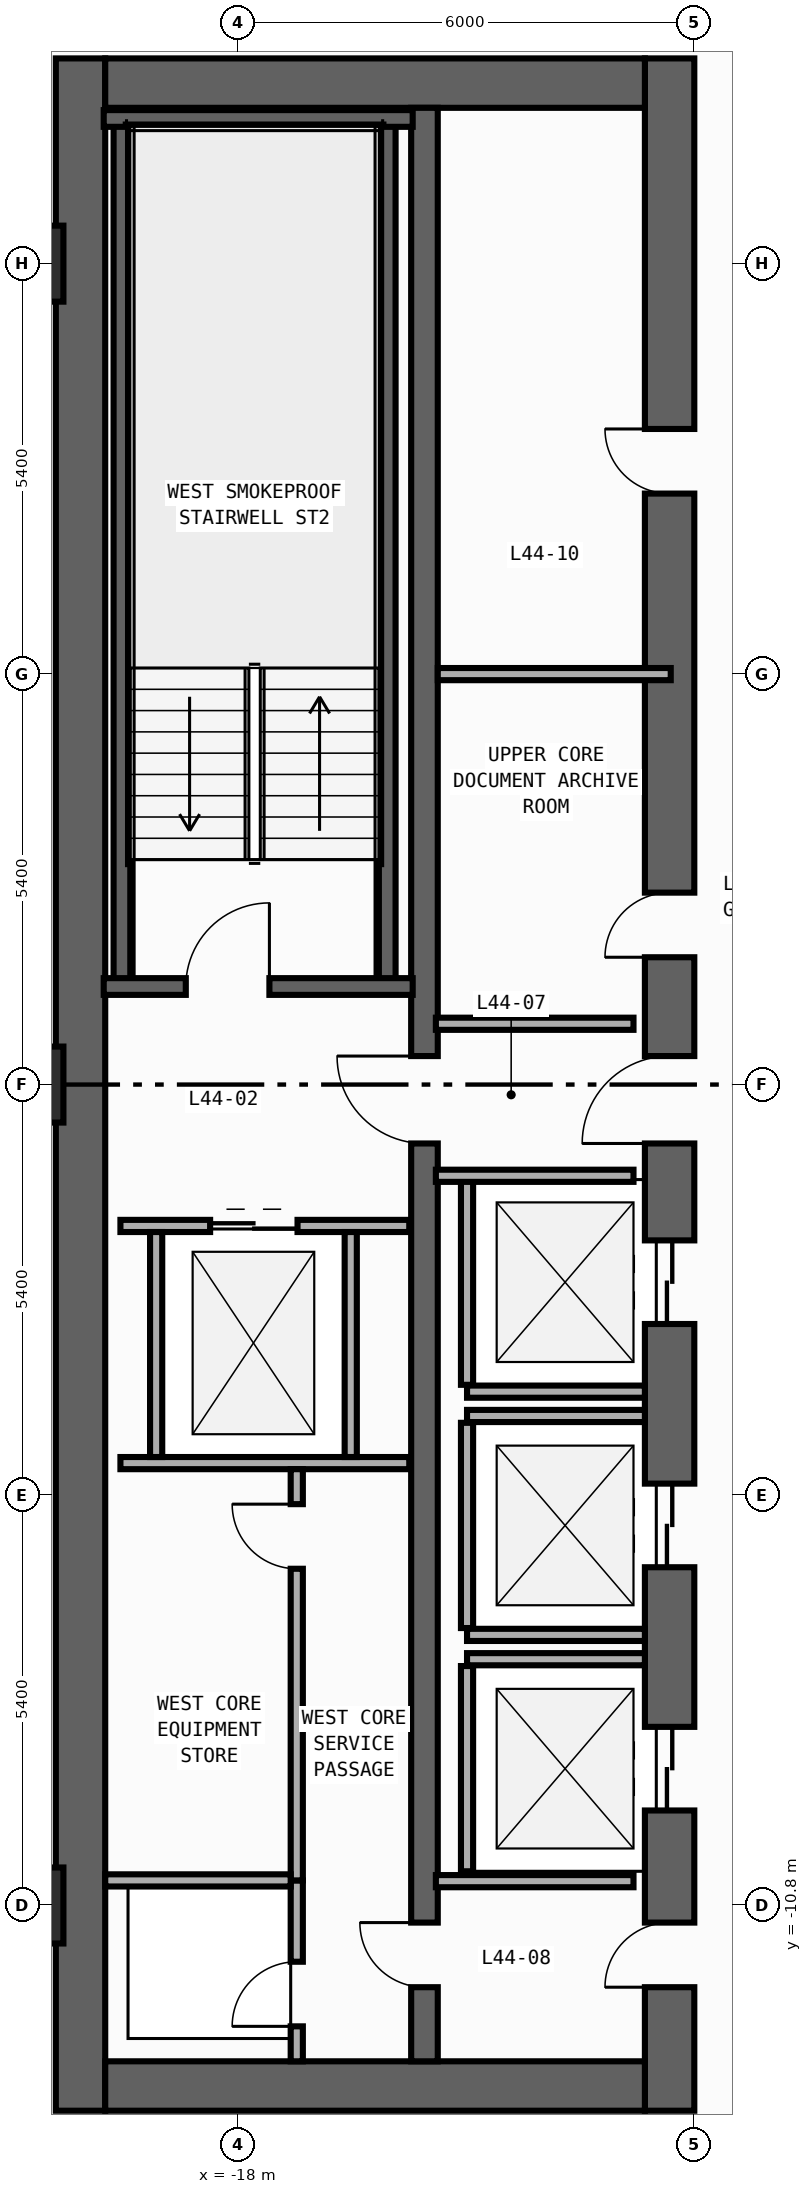
"""IFC4 building model, lengths in metres.
Left out: names, types, materials, properties, quantities, classifications, styles, units other than length and angle.
Written with IfcOpenShell. Run it as: python <this file> out.ifc"""

import sys

from ifc_helpers import new_model, si_unit, direction, frame, frame_2d, origin, origin_2d, place, context, subcontext, project, spatial, rectangle, extrude, element, fill, save


model = new_model("IFC4")
c1 = context("Model", 3, precision=1e-05, world=origin(), true_north=direction((0.0, 1.0)))
c2 = subcontext(c1, "Body", "Model", "MODEL_VIEW")
j1 = project(units=[si_unit("LENGTHUNIT", "METRE"), si_unit("PLANEANGLEUNIT", "RADIAN")], contexts=[c1])
p1 = place(None, origin())
s1 = spatial("IfcSite", under=j1, at=p1, CompositionType="ELEMENT")
p2 = place(p1, origin())
s2 = spatial("IfcBuilding", under=s1, at=p2, CompositionType="ELEMENT")
p3 = place(p2, frame((0.0, 0.0, 191.6)))
s3 = spatial("IfcBuildingStorey", under=s2, at=p3, CompositionType="ELEMENT", Elevation=191.6)
p4 = place(p3, frame((-20.075, -13.5, 0.0), z_axis=(0.0, 0.0, 1.0), x_axis=(0.0, 1.0, 0.0)))
e1 = element("IfcWall", 1, at=p4, inside=s3, PredefinedType="SHEAR", context=c2, shape_type="SweptSolid", body=[
    extrude(rectangle(XDim=27.0, YDim=0.65, at=frame_2d((13.5, 0.0))), origin(), (0.0, 0.0, 1.0), 3.54),
])
p5 = place(p3, frame((-12.325, -13.5, 0.0), z_axis=(0.0, 0.0, 1.0), x_axis=(0.0, 1.0, 0.0)))
e2 = element("IfcWall", 2, at=p5, inside=s3, PredefinedType="SHEAR", context=c2, shape_type="SweptSolid", body=[
    extrude(rectangle(XDim=27.0, YDim=0.65, at=frame_2d((13.5, 0.0))), origin(), (0.0, 0.0, 1.0), 3.54),
])
p6 = place(p5, frame((10.35, 0.0, 0.0)))
e3 = element("IfcOpeningElement", 3, at=p6, cuts=e2, PredefinedType="OPENING", context=c2, shape_type="SweptSolid", body=[
    extrude(rectangle(XDim=1.1, YDim=2.2, at=frame_2d((0.55, 1.1))), frame((0.0, 0.335, 0.0), z_axis=(0.0, -1.0, 0.0), x_axis=(1.0, 0.0, 0.0)), (0.0, 0.0, 1.0), 0.67),
])
p7 = place(p5, frame((7.15, 0.0, 0.0)))
e4 = element("IfcOpeningElement", 4, at=p7, cuts=e2, PredefinedType="OPENING", context=c2, shape_type="SweptSolid", body=[
    extrude(rectangle(XDim=1.1, YDim=2.2, at=frame_2d((0.55, 1.1))), frame((0.0, 0.335, 0.0), z_axis=(0.0, -1.0, 0.0), x_axis=(1.0, 0.0, 0.0)), (0.0, 0.0, 1.0), 0.67),
])
p8 = place(p5, frame((3.95, 0.0, 0.0)))
e5 = element("IfcOpeningElement", 5, at=p8, cuts=e2, PredefinedType="OPENING", context=c2, shape_type="SweptSolid", body=[
    extrude(rectangle(XDim=1.1, YDim=2.2, at=frame_2d((0.55, 1.1))), frame((0.0, 0.335, 0.0), z_axis=(0.0, -1.0, 0.0), x_axis=(1.0, 0.0, 0.0)), (0.0, 0.0, 1.0), 0.67),
])
p9 = place(p5, frame((15.175, 0.0, 0.0)))
e6 = element("IfcOpeningElement", 6, at=p9, cuts=e2, PredefinedType="OPENING", context=c2, shape_type="SweptSolid", body=[
    extrude(rectangle(XDim=0.85, YDim=2.1, at=frame_2d((0.425, 1.05))), frame((0.0, 0.335, 0.0), z_axis=(0.0, -1.0, 0.0), x_axis=(1.0, 0.0, 0.0)), (0.0, 0.0, 1.0), 0.67),
])
p10 = place(p5, frame((21.275, 0.0, 0.0)))
e7 = element("IfcOpeningElement", 7, at=p10, cuts=e2, PredefinedType="OPENING", context=c2, shape_type="SweptSolid", body=[
    extrude(rectangle(XDim=0.85, YDim=2.1, at=frame_2d((0.425, 1.05))), frame((0.0, 0.335, 0.0), z_axis=(0.0, -1.0, 0.0), x_axis=(1.0, 0.0, 0.0)), (0.0, 0.0, 1.0), 0.67),
])
p11 = place(p5, frame((12.725, 0.0, 0.0)))
e8 = element("IfcOpeningElement", 8, at=p11, cuts=e2, PredefinedType="OPENING", context=c2, shape_type="SweptSolid", body=[
    extrude(rectangle(XDim=1.15, YDim=2.2, at=frame_2d((0.575, 1.1))), frame((0.0, 0.335, 0.0), z_axis=(0.0, -1.0, 0.0), x_axis=(1.0, 0.0, 0.0)), (0.0, 0.0, 1.0), 0.67),
])
p12 = place(p5, frame((1.625, 0.0, 0.0)))
e9 = element("IfcOpeningElement", 9, at=p12, cuts=e2, PredefinedType="OPENING", context=c2, shape_type="SweptSolid", body=[
    extrude(rectangle(XDim=0.85, YDim=2.1, at=frame_2d((0.425, 1.05))), frame((0.0, 0.335, 0.0), z_axis=(0.0, -1.0, 0.0), x_axis=(1.0, 0.0, 0.0)), (0.0, 0.0, 1.0), 0.67),
])
for number, where, z_axis, x_axis in (
    (10, (-19.75, -13.175, 0.0), (0.0, 0.0, 1.0), (1.0, 0.0, 0.0)),
    (11, (-19.75, 13.175, 0.0), (0.0, 0.0, 1.0), (1.0, 0.0, 0.0)),
):
    element("IfcWall", number, at=place(p3, frame(where, z_axis=z_axis, x_axis=x_axis)), inside=s3, PredefinedType="SHEAR", context=c2, shape_type="SweptSolid", body=[
        extrude(rectangle(XDim=7.1, YDim=0.65, at=frame_2d((3.55, 0.0))), origin(), (0.0, 0.0, 1.0), 3.54),
    ])
p13 = place(p3, frame((-15.55, -12.85, 0.0), z_axis=(0.0, 0.0, 1.0), x_axis=(0.0, 1.0, 0.0)))
e12 = element("IfcWall", 12, at=p13, inside=s3, PredefinedType="SHEAR", context=c2, shape_type="SweptSolid", body=[
    extrude(rectangle(XDim=25.7, YDim=0.35, at=frame_2d((12.85, 0.0))), origin(), (0.0, 0.0, 1.0), 3.54),
])
p14 = place(p13, frame((12.075, 0.0, 0.0)))
e13 = element("IfcOpeningElement", 13, at=p14, cuts=e12, PredefinedType="OPENING", context=c2, shape_type="SweptSolid", body=[
    extrude(rectangle(XDim=1.15, YDim=2.2, at=frame_2d((0.575, 1.1))), frame((0.0, 0.185, 0.0), z_axis=(0.0, -1.0, 0.0), x_axis=(1.0, 0.0, 0.0)), (0.0, 0.0, 1.0), 0.37),
])
p15 = place(p13, frame((0.975, 0.0, 0.0)))
e14 = element("IfcOpeningElement", 14, at=p15, cuts=e12, PredefinedType="OPENING", context=c2, shape_type="SweptSolid", body=[
    extrude(rectangle(XDim=0.85, YDim=2.1, at=frame_2d((0.425, 1.05))), frame((0.0, 0.185, 0.0), z_axis=(0.0, -1.0, 0.0), x_axis=(1.0, 0.0, 0.0)), (0.0, 0.0, 1.0), 0.37),
])
for number, where, z_axis, x_axis in (
    (15, (-16.04, 1.29, 0.0), (0.0, 0.0, 1.0), (0.0, 1.0, 0.0)),
    (16, (-19.53, 1.29, 0.0), (0.0, 0.0, 1.0), (0.0, 1.0, 0.0)),
):
    element("IfcWall", number, at=place(p3, frame(where, z_axis=z_axis, x_axis=x_axis)), inside=s3, PredefinedType="SHEAR", context=c2, shape_type="SweptSolid", body=[
        extrude(rectangle(XDim=11.42, YDim=0.22, at=frame_2d((5.71, 0.0))), origin(), (0.0, 0.0, 1.0), 3.54),
    ])
p16 = place(p3, frame((-19.77, 12.71, 0.0), z_axis=(0.0, 0.0, 1.0), x_axis=(1.0, 0.0, 0.0)))
e17 = element("IfcWall", 17, at=p16, inside=s3, PredefinedType="SHEAR", context=c2, shape_type="SweptSolid", body=[
    extrude(rectangle(XDim=4.065, YDim=0.22, at=frame_2d((2.032, 0.0))), origin(), (0.0, 0.0, 1.0), 3.54),
])
p17 = place(p3, frame((-19.77, 1.29, 0.0), z_axis=(0.0, 0.0, 1.0), x_axis=(1.0, 0.0, 0.0)))
e18 = element("IfcWall", 18, at=p17, inside=s3, PredefinedType="SHEAR", context=c2, shape_type="SweptSolid", body=[
    extrude(rectangle(XDim=4.065, YDim=0.22, at=frame_2d((2.032, 0.0))), origin(), (0.0, 0.0, 1.0), 3.54),
])
p18 = place(p17, frame((1.08, 0.0, 0.0)))
e19 = element("IfcOpeningElement", 19, at=p18, cuts=e18, PredefinedType="OPENING", context=c2, shape_type="SweptSolid", body=[
    extrude(rectangle(XDim=1.1, YDim=2.2, at=frame_2d((0.55, 1.1))), frame((0.0, 0.12, 0.0), z_axis=(0.0, -1.0, 0.0), x_axis=(1.0, 0.0, 0.0)), (0.0, 0.0, 1.0), 0.24),
])
for number, where, z_axis, x_axis in (
    (20, (-20.8, -10.8, 0.0), (0.0, 0.0, 1.0), (1.0, 0.0, 0.0)),
    (21, (-20.8, 0.0, 0.0), (0.0, 0.0, 1.0), (1.0, 0.0, 0.0)),
    (22, (-20.8, 10.8, 0.0), (0.0, 0.0, 1.0), (1.0, 0.0, 0.0)),
):
    element("IfcColumn", number, at=place(p3, frame(where, z_axis=z_axis, x_axis=x_axis)), inside=s3, PredefinedType="COLUMN", context=c2, shape_type="SweptSolid", body=[
        extrude(rectangle(XDim=1.0, YDim=1.0, at=origin_2d()), origin(), (0.0, 0.0, 1.0), 3.8),
    ])
p19 = place(p3, frame((-14.99, -4.04, 0.0), z_axis=(0.0, 0.0, 1.0), x_axis=(1.0, 0.0, 0.0)))
e23 = element("IfcWall", 23, at=p19, inside=s3, PredefinedType="STANDARD", context=c2, shape_type="SweptSolid", body=[
    extrude(rectangle(XDim=2.34, YDim=0.16, at=frame_2d((1.17, 0.0))), origin(), (0.0, 0.0, 1.0), 3.54),
])
p20 = place(p3, frame((-14.99, -3.95, 0.0), z_axis=(0.0, 0.0, 1.0), x_axis=(0.0, 1.0, 0.0)))
e24 = element("IfcWall", 24, at=p20, inside=s3, PredefinedType="STANDARD", context=c2, shape_type="SweptSolid", body=[
    extrude(rectangle(XDim=2.7, YDim=0.16, at=frame_2d((1.35, 0.0))), origin(), (0.0, 0.0, 1.0), 3.54),
])
for number, where, z_axis, x_axis in (
    (25, (-14.99, -7.24, 0.0), (0.0, 0.0, 1.0), (1.0, 0.0, 0.0)),
    (26, (-14.99, -4.36, 0.0), (0.0, 0.0, 1.0), (1.0, 0.0, 0.0)),
):
    element("IfcWall", number, at=place(p3, frame(where, z_axis=z_axis, x_axis=x_axis)), inside=s3, PredefinedType="STANDARD", context=c2, shape_type="SweptSolid", body=[
        extrude(rectangle(XDim=2.34, YDim=0.16, at=frame_2d((1.17, 0.0))), origin(), (0.0, 0.0, 1.0), 3.54),
    ])
p21 = place(p3, frame((-14.99, -7.15, 0.0), z_axis=(0.0, 0.0, 1.0), x_axis=(0.0, 1.0, 0.0)))
e27 = element("IfcWall", 27, at=p21, inside=s3, PredefinedType="STANDARD", context=c2, shape_type="SweptSolid", body=[
    extrude(rectangle(XDim=2.7, YDim=0.16, at=frame_2d((1.35, 0.0))), origin(), (0.0, 0.0, 1.0), 3.54),
])
p22 = place(p3, frame((-14.99, -7.56, 0.0), z_axis=(0.0, 0.0, 1.0), x_axis=(1.0, 0.0, 0.0)))
e28 = element("IfcWall", 28, at=p22, inside=s3, PredefinedType="STANDARD", context=c2, shape_type="SweptSolid", body=[
    extrude(rectangle(XDim=2.34, YDim=0.16, at=frame_2d((1.17, 0.0))), origin(), (0.0, 0.0, 1.0), 3.54),
])
p23 = place(p3, frame((-14.99, -10.35, 0.0), z_axis=(0.0, 0.0, 1.0), x_axis=(0.0, 1.0, 0.0)))
e29 = element("IfcWall", 29, at=p23, inside=s3, PredefinedType="STANDARD", context=c2, shape_type="SweptSolid", body=[
    extrude(rectangle(XDim=2.7, YDim=0.16, at=frame_2d((1.35, 0.0))), origin(), (0.0, 0.0, 1.0), 3.54),
])
p24 = place(p3, frame((-19.55, -1.86, 0.0), z_axis=(0.0, 0.0, 1.0), x_axis=(1.0, 0.0, 0.0)))
e30 = element("IfcWall", 30, at=p24, inside=s3, PredefinedType="STANDARD", context=c2, shape_type="SweptSolid", body=[
    extrude(rectangle(XDim=3.8, YDim=0.16, at=frame_2d((1.9, 0.0))), origin(), (0.0, 0.0, 1.0), 3.54),
])
p25 = place(p24, frame((1.18, 0.0, 0.0)))
e31 = element("IfcOpeningElement", 31, at=p25, cuts=e30, PredefinedType="OPENING", context=c2, shape_type="SweptSolid", body=[
    extrude(rectangle(XDim=1.15, YDim=2.2, at=frame_2d((0.575, 1.1))), frame((0.0, 0.09, 0.0), z_axis=(0.0, -1.0, 0.0), x_axis=(1.0, 0.0, 0.0)), (0.0, 0.0, 1.0), 0.18),
])
p26 = place(p3, frame((-19.55, -4.98, 0.0), z_axis=(0.0, 0.0, 1.0), x_axis=(1.0, 0.0, 0.0)))
e32 = element("IfcWall", 32, at=p26, inside=s3, PredefinedType="STANDARD", context=c2, shape_type="SweptSolid", body=[
    extrude(rectangle(XDim=3.8, YDim=0.16, at=frame_2d((1.9, 0.0))), origin(), (0.0, 0.0, 1.0), 3.54),
])
for number, where, z_axis, x_axis in (
    (33, (-19.08, -4.9, 0.0), (0.0, 0.0, 1.0), (0.0, 1.0, 0.0)),
    (34, (-16.52, -4.9, 0.0), (0.0, 0.0, 1.0), (0.0, 1.0, 0.0)),
):
    element("IfcWall", number, at=place(p3, frame(where, z_axis=z_axis, x_axis=x_axis)), inside=s3, PredefinedType="STANDARD", context=c2, shape_type="SweptSolid", body=[
        extrude(rectangle(XDim=2.96, YDim=0.16, at=frame_2d((1.48, 0.0))), origin(), (0.0, 0.0, 1.0), 3.54),
    ])
for number, where, z_axis, x_axis in (
    (35, (-15.4, 0.8, 0.0), (0.0, 0.0, 1.0), (1.0, 0.0, 0.0)),
    (36, (-15.4, -1.2, 0.0), (0.0, 0.0, 1.0), (1.0, 0.0, 0.0)),
    (37, (-15.4, -10.48, 0.0), (0.0, 0.0, 1.0), (1.0, 0.0, 0.0)),
):
    element("IfcWall", number, at=place(p3, frame(where, z_axis=z_axis, x_axis=x_axis)), inside=s3, PredefinedType="STANDARD", context=c2, shape_type="SweptSolid", body=[
        extrude(rectangle(XDim=2.6, YDim=0.16, at=frame_2d((1.3, 0.0))), origin(), (0.0, 0.0, 1.0), 3.54),
    ])
p27 = place(p3, frame((-17.23, -12.85, 0.0), z_axis=(0.0, 0.0, 1.0), x_axis=(0.0, 1.0, 0.0)))
e38 = element("IfcWall", 38, at=p27, inside=s3, PredefinedType="PARTITIONING", context=c2, shape_type="SweptSolid", body=[
    extrude(rectangle(XDim=2.38, YDim=0.16, at=frame_2d((1.19, 0.0))), origin(), (0.0, 0.0, 1.0), 3.54),
])
p28 = place(p27, frame((0.46, 0.0, 0.0)))
e39 = element("IfcOpeningElement", 39, at=p28, cuts=e38, PredefinedType="OPENING", context=c2, shape_type="SweptSolid", body=[
    extrude(rectangle(XDim=0.85, YDim=2.1, at=frame_2d((0.425, 1.05))), frame((0.0, 0.09, 0.0), z_axis=(0.0, -1.0, 0.0), x_axis=(1.0, 0.0, 0.0)), (0.0, 0.0, 1.0), 0.18),
])
p29 = place(p3, frame((-17.23, -10.47, 0.0), z_axis=(0.0, 0.0, 1.0), x_axis=(0.0, 1.0, 0.0)))
e40 = element("IfcWall", 40, at=p29, inside=s3, PredefinedType="PARTITIONING", context=c2, shape_type="SweptSolid", body=[
    extrude(rectangle(XDim=5.41, YDim=0.16, at=frame_2d((2.705, 0.0))), origin(), (0.0, 0.0, 1.0), 3.54),
])
p30 = place(p29, frame((4.1, 0.0, 0.0)))
e41 = element("IfcOpeningElement", 41, at=p30, cuts=e40, PredefinedType="OPENING", context=c2, shape_type="SweptSolid", body=[
    extrude(rectangle(XDim=0.85, YDim=2.1, at=frame_2d((0.425, 1.05))), frame((0.0, 0.09, 0.0), z_axis=(0.0, -1.0, 0.0), x_axis=(1.0, 0.0, 0.0)), (0.0, 0.0, 1.0), 0.18),
])
p31 = place(p3, frame((-19.75, -10.47, 0.0), z_axis=(0.0, 0.0, 1.0), x_axis=(1.0, 0.0, 0.0)))
e42 = element("IfcWall", 42, at=p31, inside=s3, PredefinedType="PARTITIONING", context=c2, shape_type="SweptSolid", body=[
    extrude(rectangle(XDim=2.44, YDim=0.16, at=frame_2d((1.22, 0.0))), origin(), (0.0, 0.0, 1.0), 3.54),
])
p32 = place(p3, frame((-15.375, 5.4, 0.0), z_axis=(0.0, 0.0, 1.0), x_axis=(1.0, 0.0, 0.0)))
e43 = element("IfcWall", 43, at=p32, inside=s3, PredefinedType="PARTITIONING", context=c2, shape_type="SweptSolid", body=[
    extrude(rectangle(XDim=3.065, YDim=0.16, at=frame_2d((1.532, 0.0))), origin(), (0.0, 0.0, 1.0), 3.54),
])
p33 = place(p18, origin())
e44 = element("IfcDoor", 44, at=p33, inside=s3, OperationType="SINGLE_SWING_RIGHT", PredefinedType="DOOR", context=c2, shape_type="SweptSolid", body=[
    extrude(rectangle(XDim=1.1, YDim=2.2, at=frame_2d((0.55, 1.1))), frame((0.0, 0.025, 0.0), z_axis=(0.0, -1.0, 0.0), x_axis=(1.0, 0.0, 0.0)), (0.0, 0.0, 1.0), 0.05),
])
fill(e19, e44)
p34 = place(p6, origin())
e45 = element("IfcDoor", 45, at=p34, inside=s3, OperationType="DOUBLE_DOOR_SLIDING", PredefinedType="DOOR", context=c2, shape_type="SweptSolid", body=[
    extrude(rectangle(XDim=1.1, YDim=2.2, at=frame_2d((0.55, 1.1))), frame((0.0, 0.025, 0.0), z_axis=(0.0, -1.0, 0.0), x_axis=(1.0, 0.0, 0.0)), (0.0, 0.0, 1.0), 0.05),
])
fill(e3, e45)
p35 = place(p7, origin())
e46 = element("IfcDoor", 46, at=p35, inside=s3, OperationType="DOUBLE_DOOR_SLIDING", PredefinedType="DOOR", context=c2, shape_type="SweptSolid", body=[
    extrude(rectangle(XDim=1.1, YDim=2.2, at=frame_2d((0.55, 1.1))), frame((0.0, 0.025, 0.0), z_axis=(0.0, -1.0, 0.0), x_axis=(1.0, 0.0, 0.0)), (0.0, 0.0, 1.0), 0.05),
])
fill(e4, e46)
p36 = place(p8, origin())
e47 = element("IfcDoor", 47, at=p36, inside=s3, OperationType="DOUBLE_DOOR_SLIDING", PredefinedType="DOOR", context=c2, shape_type="SweptSolid", body=[
    extrude(rectangle(XDim=1.1, YDim=2.2, at=frame_2d((0.55, 1.1))), frame((0.0, 0.025, 0.0), z_axis=(0.0, -1.0, 0.0), x_axis=(1.0, 0.0, 0.0)), (0.0, 0.0, 1.0), 0.05),
])
fill(e5, e47)
p37 = place(p9, origin())
e48 = element("IfcDoor", 48, at=p37, inside=s3, OperationType="SINGLE_SWING_LEFT", PredefinedType="DOOR", context=c2, shape_type="SweptSolid", body=[
    extrude(rectangle(XDim=0.85, YDim=2.1, at=frame_2d((0.425, 1.05))), frame((0.0, 0.025, 0.0), z_axis=(0.0, -1.0, 0.0), x_axis=(1.0, 0.0, 0.0)), (0.0, 0.0, 1.0), 0.05),
])
fill(e6, e48)
p38 = place(p10, origin())
e49 = element("IfcDoor", 49, at=p38, inside=s3, OperationType="SINGLE_SWING_RIGHT", PredefinedType="DOOR", context=c2, shape_type="SweptSolid", body=[
    extrude(rectangle(XDim=0.85, YDim=2.1, at=frame_2d((0.425, 1.05))), frame((0.0, 0.025, 0.0), z_axis=(0.0, -1.0, 0.0), x_axis=(1.0, 0.0, 0.0)), (0.0, 0.0, 1.0), 0.05),
])
fill(e7, e49)
p39 = place(p11, origin())
e50 = element("IfcDoor", 50, at=p39, inside=s3, OperationType="SINGLE_SWING_LEFT", PredefinedType="DOOR", context=c2, shape_type="SweptSolid", body=[
    extrude(rectangle(XDim=1.15, YDim=2.2, at=frame_2d((0.575, 1.1))), frame((0.0, 0.025, 0.0), z_axis=(0.0, -1.0, 0.0), x_axis=(1.0, 0.0, 0.0)), (0.0, 0.0, 1.0), 0.05),
])
fill(e8, e50)
p40 = place(p14, origin())
e51 = element("IfcDoor", 51, at=p40, inside=s3, OperationType="SINGLE_SWING_RIGHT", PredefinedType="DOOR", context=c2, shape_type="SweptSolid", body=[
    extrude(rectangle(XDim=1.15, YDim=2.2, at=frame_2d((0.575, 1.1))), frame((0.0, 0.025, 0.0), z_axis=(0.0, -1.0, 0.0), x_axis=(1.0, 0.0, 0.0)), (0.0, 0.0, 1.0), 0.05),
])
fill(e13, e51)
p41 = place(p12, origin())
e52 = element("IfcDoor", 52, at=p41, inside=s3, OperationType="SINGLE_SWING_LEFT", PredefinedType="DOOR", context=c2, shape_type="SweptSolid", body=[
    extrude(rectangle(XDim=0.85, YDim=2.1, at=frame_2d((0.425, 1.05))), frame((0.0, 0.025, 0.0), z_axis=(0.0, -1.0, 0.0), x_axis=(1.0, 0.0, 0.0)), (0.0, 0.0, 1.0), 0.05),
])
fill(e9, e52)
p42 = place(p15, origin())
e53 = element("IfcDoor", 53, at=p42, inside=s3, OperationType="SINGLE_SWING_RIGHT", PredefinedType="DOOR", context=c2, shape_type="SweptSolid", body=[
    extrude(rectangle(XDim=0.85, YDim=2.1, at=frame_2d((0.425, 1.05))), frame((0.0, 0.025, 0.0), z_axis=(0.0, -1.0, 0.0), x_axis=(1.0, 0.0, 0.0)), (0.0, 0.0, 1.0), 0.05),
])
fill(e14, e53)
p43 = place(p25, origin())
e54 = element("IfcDoor", 54, at=p43, inside=s3, OperationType="DOUBLE_DOOR_SLIDING", PredefinedType="DOOR", context=c2, shape_type="SweptSolid", body=[
    extrude(rectangle(XDim=1.15, YDim=2.2, at=frame_2d((0.575, 1.1))), frame((0.0, 0.025, 0.0), z_axis=(0.0, -1.0, 0.0), x_axis=(1.0, 0.0, 0.0)), (0.0, 0.0, 1.0), 0.05),
])
fill(e31, e54)
p44 = place(p28, origin())
e55 = element("IfcDoor", 55, at=p44, inside=s3, OperationType="SINGLE_SWING_LEFT", PredefinedType="DOOR", context=c2, shape_type="SweptSolid", body=[
    extrude(rectangle(XDim=0.85, YDim=2.1, at=frame_2d((0.425, 1.05))), frame((0.0, 0.025, 0.0), z_axis=(0.0, -1.0, 0.0), x_axis=(1.0, 0.0, 0.0)), (0.0, 0.0, 1.0), 0.05),
])
fill(e39, e55)
p45 = place(p30, origin())
e56 = element("IfcDoor", 56, at=p45, inside=s3, OperationType="SINGLE_SWING_RIGHT", PredefinedType="DOOR", context=c2, shape_type="SweptSolid", body=[
    extrude(rectangle(XDim=0.85, YDim=2.1, at=frame_2d((0.425, 1.05))), frame((0.0, 0.025, 0.0), z_axis=(0.0, -1.0, 0.0), x_axis=(1.0, 0.0, 0.0)), (0.0, 0.0, 1.0), 0.05),
])
fill(e41, e56)
save(model, sys.argv[1])
